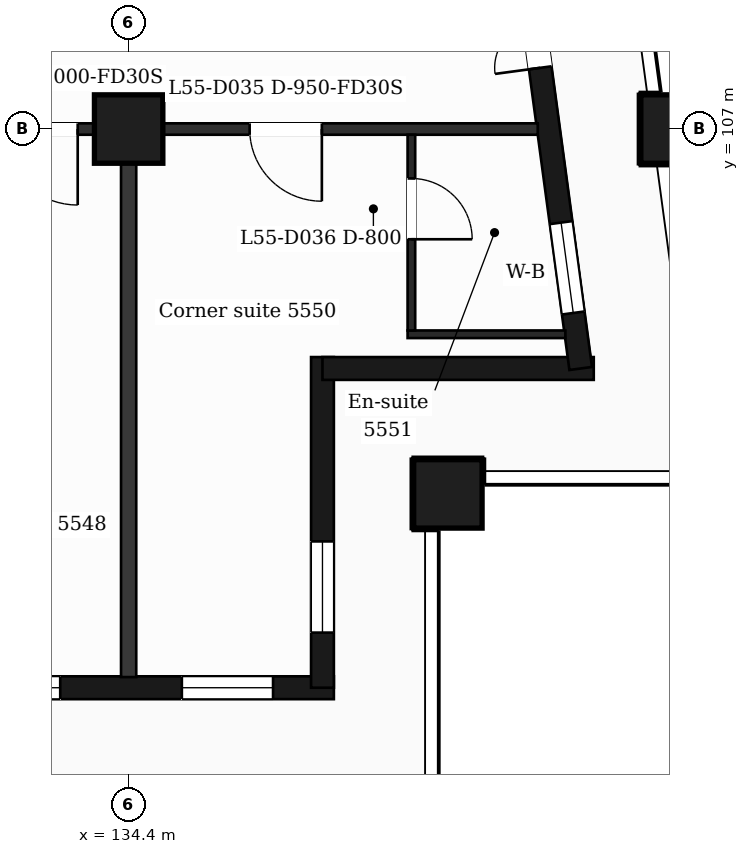
"""IFC4 building model, lengths in metres.
Left out: names, types, materials, properties, quantities, classifications, styles, units other than length and angle.
Written with IfcOpenShell. Run it as: python <this file> out.ifc"""

import sys

from ifc_helpers import new_model, si_unit, direction, frame, frame_2d, origin, origin_2d, place, context, subcontext, project, spatial, rectangle, extrude, element, fill, save


model = new_model("IFC4")
c1 = context("Model", 3, precision=1e-05, world=origin(), true_north=direction((0.0, 1.0)))
c2 = subcontext(c1, "Body", "Model", "MODEL_VIEW")
j1 = project(units=[si_unit("LENGTHUNIT", "METRE"), si_unit("PLANEANGLEUNIT", "RADIAN")], contexts=[c1])
p1 = place(None, origin())
s1 = spatial("IfcSite", under=j1, at=p1, CompositionType="ELEMENT")
p2 = place(p1, origin())
s2 = spatial("IfcBuilding", under=s1, at=p2, CompositionType="ELEMENT")
p3 = place(p2, frame((0.0, 0.0, 228.1)))
s3 = spatial("IfcBuildingStorey", under=s2, at=p3, CompositionType="ELEMENT", Elevation=228.1)
for number, where, z_axis, x_axis in (
    (1, (138.6, 102.2, 0.0), (0.0, 0.0, 1.0), (1.0, 0.0, 0.0)),
    (2, (134.4, 107.0, 0.0), (0.0, 0.0, 1.0), (1.0, 0.0, 0.0)),
    (3, (141.588, 107.0, 0.0), (0.0, 0.0, 1.0), (1.0, 0.0, 0.0)),
):
    element("IfcColumn", number, at=place(p3, frame(where, z_axis=z_axis, x_axis=x_axis)), inside=s3, PredefinedType="COLUMN", context=c2, shape_type="SweptSolid", body=[
        extrude(rectangle(XDim=0.9, YDim=0.9, at=origin_2d()), origin(), (0.0, 0.0, 1.0), 3.7),
    ])
p4 = place(p3, frame((89.85, 99.65, 0.0), z_axis=(0.0, 0.0, 1.0), x_axis=(1.0, 0.0, 0.0)))
e4 = element("IfcWall", 4, at=p4, inside=s3, PredefinedType="SOLIDWALL", context=c2, shape_type="SweptSolid", body=[
    extrude(rectangle(XDim=47.25, YDim=0.3, at=frame_2d((23.625, 0.0))), origin(), (0.0, 0.0, 1.0), 3.38),
])
p5 = place(p4, frame((0.725, 0.0, 0.9)))
e5 = element("IfcOpeningElement", 5, at=p5, cuts=e4, PredefinedType="OPENING", context=c2, shape_type="SweptSolid", body=[
    extrude(rectangle(XDim=1.2, YDim=2.1, at=frame_2d((0.6, 1.05))), frame((0.0, 0.16, 0.0), z_axis=(0.0, -1.0, 0.0), x_axis=(1.0, 0.0, 0.0)), (0.0, 0.0, 1.0), 0.32),
])
p6 = place(p4, frame((3.45, 0.0, 0.9)))
e6 = element("IfcOpeningElement", 6, at=p6, cuts=e4, PredefinedType="OPENING", context=c2, shape_type="SweptSolid", body=[
    extrude(rectangle(XDim=2.4, YDim=2.1, at=frame_2d((1.2, 1.05))), frame((0.0, 0.16, 0.0), z_axis=(0.0, -1.0, 0.0), x_axis=(1.0, 0.0, 0.0)), (0.0, 0.0, 1.0), 0.32),
])
p7 = place(p4, frame((7.35, 0.0, 0.0)))
e7 = element("IfcOpeningElement", 7, at=p7, cuts=e4, PredefinedType="OPENING", context=c2, shape_type="SweptSolid", body=[
    extrude(rectangle(XDim=1.2, YDim=2.4, at=frame_2d((0.6, 1.2))), frame((0.0, 0.16, 0.0), z_axis=(0.0, -1.0, 0.0), x_axis=(1.0, 0.0, 0.0)), (0.0, 0.0, 1.0), 0.32),
])
p8 = place(p4, frame((9.15, 0.0, 0.9)))
e8 = element("IfcOpeningElement", 8, at=p8, cuts=e4, PredefinedType="OPENING", context=c2, shape_type="SweptSolid", body=[
    extrude(rectangle(XDim=1.2, YDim=2.1, at=frame_2d((0.6, 1.05))), frame((0.0, 0.16, 0.0), z_axis=(0.0, -1.0, 0.0), x_axis=(1.0, 0.0, 0.0)), (0.0, 0.0, 1.0), 0.32),
])
p9 = place(p4, frame((11.85, 0.0, 0.9)))
e9 = element("IfcOpeningElement", 9, at=p9, cuts=e4, PredefinedType="OPENING", context=c2, shape_type="SweptSolid", body=[
    extrude(rectangle(XDim=2.4, YDim=2.1, at=frame_2d((1.2, 1.05))), frame((0.0, 0.16, 0.0), z_axis=(0.0, -1.0, 0.0), x_axis=(1.0, 0.0, 0.0)), (0.0, 0.0, 1.0), 0.32),
])
p10 = place(p4, frame((16.05, 0.0, 0.9)))
e10 = element("IfcOpeningElement", 10, at=p10, cuts=e4, PredefinedType="OPENING", context=c2, shape_type="SweptSolid", body=[
    extrude(rectangle(XDim=2.4, YDim=2.1, at=frame_2d((1.2, 1.05))), frame((0.0, 0.16, 0.0), z_axis=(0.0, -1.0, 0.0), x_axis=(1.0, 0.0, 0.0)), (0.0, 0.0, 1.0), 0.32),
])
p11 = place(p4, frame((20.85, 0.0, 0.9)))
e11 = element("IfcOpeningElement", 11, at=p11, cuts=e4, PredefinedType="OPENING", context=c2, shape_type="SweptSolid", body=[
    extrude(rectangle(XDim=1.2, YDim=2.1, at=frame_2d((0.6, 1.05))), frame((0.0, 0.16, 0.0), z_axis=(0.0, -1.0, 0.0), x_axis=(1.0, 0.0, 0.0)), (0.0, 0.0, 1.0), 0.32),
])
p12 = place(p4, frame((25.05, 0.0, 0.9)))
e12 = element("IfcOpeningElement", 12, at=p12, cuts=e4, PredefinedType="OPENING", context=c2, shape_type="SweptSolid", body=[
    extrude(rectangle(XDim=1.2, YDim=2.1, at=frame_2d((0.6, 1.05))), frame((0.0, 0.16, 0.0), z_axis=(0.0, -1.0, 0.0), x_axis=(1.0, 0.0, 0.0)), (0.0, 0.0, 1.0), 0.32),
])
p13 = place(p4, frame((28.65, 0.0, 0.9)))
e13 = element("IfcOpeningElement", 13, at=p13, cuts=e4, PredefinedType="OPENING", context=c2, shape_type="SweptSolid", body=[
    extrude(rectangle(XDim=2.4, YDim=2.1, at=frame_2d((1.2, 1.05))), frame((0.0, 0.16, 0.0), z_axis=(0.0, -1.0, 0.0), x_axis=(1.0, 0.0, 0.0)), (0.0, 0.0, 1.0), 0.32),
])
p14 = place(p4, frame((32.85, 0.0, 0.9)))
e14 = element("IfcOpeningElement", 14, at=p14, cuts=e4, PredefinedType="OPENING", context=c2, shape_type="SweptSolid", body=[
    extrude(rectangle(XDim=2.4, YDim=2.1, at=frame_2d((1.2, 1.05))), frame((0.0, 0.16, 0.0), z_axis=(0.0, -1.0, 0.0), x_axis=(1.0, 0.0, 0.0)), (0.0, 0.0, 1.0), 0.32),
])
p15 = place(p4, frame((37.05, 0.0, 0.9)))
e15 = element("IfcOpeningElement", 15, at=p15, cuts=e4, PredefinedType="OPENING", context=c2, shape_type="SweptSolid", body=[
    extrude(rectangle(XDim=2.4, YDim=2.1, at=frame_2d((1.2, 1.05))), frame((0.0, 0.16, 0.0), z_axis=(0.0, -1.0, 0.0), x_axis=(1.0, 0.0, 0.0)), (0.0, 0.0, 1.0), 0.32),
])
p16 = place(p4, frame((41.25, 0.0, 0.9)))
e16 = element("IfcOpeningElement", 16, at=p16, cuts=e4, PredefinedType="OPENING", context=c2, shape_type="SweptSolid", body=[
    extrude(rectangle(XDim=2.4, YDim=2.1, at=frame_2d((1.2, 1.05))), frame((0.0, 0.16, 0.0), z_axis=(0.0, -1.0, 0.0), x_axis=(1.0, 0.0, 0.0)), (0.0, 0.0, 1.0), 0.32),
])
p17 = place(p4, frame((45.25, 0.0, 0.9)))
e17 = element("IfcOpeningElement", 17, at=p17, cuts=e4, PredefinedType="OPENING", context=c2, shape_type="SweptSolid", body=[
    extrude(rectangle(XDim=1.2, YDim=2.1, at=frame_2d((0.6, 1.05))), frame((0.0, 0.16, 0.0), z_axis=(0.0, -1.0, 0.0), x_axis=(1.0, 0.0, 0.0)), (0.0, 0.0, 1.0), 0.32),
])
p18 = place(p3, frame((136.95, 99.65, 0.0), z_axis=(0.0, 0.0, 1.0), x_axis=(0.0, 1.0, 0.0)))
e18 = element("IfcWall", 18, at=p18, inside=s3, PredefinedType="SOLIDWALL", context=c2, shape_type="SweptSolid", body=[
    extrude(rectangle(XDim=4.35, YDim=0.3, at=frame_2d((2.175, 0.0))), origin(), (0.0, 0.0, 1.0), 3.38),
])
p19 = place(p18, frame((0.725, 0.0, 0.9)))
e19 = element("IfcOpeningElement", 19, at=p19, cuts=e18, PredefinedType="OPENING", context=c2, shape_type="SweptSolid", body=[
    extrude(rectangle(XDim=1.2, YDim=2.1, at=frame_2d((0.6, 1.05))), frame((0.0, 0.16, 0.0), z_axis=(0.0, -1.0, 0.0), x_axis=(1.0, 0.0, 0.0)), (0.0, 0.0, 1.0), 0.32),
])
p20 = place(p3, frame((136.95, 103.85, 0.0), z_axis=(0.0, 0.0, 1.0), x_axis=(1.0, 0.0, 0.0)))
e20 = element("IfcWall", 20, at=p20, inside=s3, PredefinedType="SOLIDWALL", context=c2, shape_type="SweptSolid", body=[
    extrude(rectangle(XDim=3.569, YDim=0.3, at=frame_2d((1.785, 0.0))), origin(), (0.0, 0.0, 1.0), 3.38),
])
p21 = place(p3, frame((140.348, 103.85, 0.0), z_axis=(0.0, 0.0, 1.0), x_axis=(-0.133431549479, 0.991058031401, 0.0)))
e21 = element("IfcWall", 21, at=p21, inside=s3, PredefinedType="SOLIDWALL", context=c2, shape_type="SweptSolid", body=[
    extrude(rectangle(XDim=6.609, YDim=0.3, at=frame_2d((3.304, 0.0))), origin(), (0.0, 0.0, 1.0), 3.38),
])
p22 = place(p21, frame((0.737, 0.0, 0.9)))
e22 = element("IfcOpeningElement", 22, at=p22, cuts=e21, PredefinedType="OPENING", context=c2, shape_type="SweptSolid", body=[
    extrude(rectangle(XDim=1.2, YDim=2.1, at=frame_2d((0.6, 1.05))), frame((0.0, 0.16, 0.0), z_axis=(0.0, -1.0, 0.0), x_axis=(1.0, 0.0, 0.0)), (0.0, 0.0, 1.0), 0.32),
])
p23 = place(p21, frame((3.991, 0.0, 0.0)))
e23 = element("IfcOpeningElement", 23, at=p23, cuts=e21, PredefinedType="OPENING", context=c2, shape_type="SweptSolid", body=[
    extrude(rectangle(XDim=1.2, YDim=2.4, at=frame_2d((0.6, 1.2))), frame((0.0, 0.16, 0.0), z_axis=(0.0, -1.0, 0.0), x_axis=(1.0, 0.0, 0.0)), (0.0, 0.0, 1.0), 0.32),
])
p24 = place(p3, frame((138.07, 104.3, 0.0), z_axis=(0.0, 0.0, 1.0), x_axis=(1.0, 0.0, 0.0)))
e24 = element("IfcWall", 24, at=p24, inside=s3, PredefinedType="PARTITIONING", context=c2, shape_type="SweptSolid", body=[
    extrude(rectangle(XDim=2.076, YDim=0.1, at=frame_2d((1.038, 0.0))), origin(), (0.0, 0.0, 1.0), 3.38),
])
p25 = place(p3, frame((87.018, 107.0, 0.0), z_axis=(0.0, 0.0, 1.0), x_axis=(1.0, 0.0, 0.0)))
e25 = element("IfcWall", 25, at=p25, inside=s3, PredefinedType="PARTITIONING", context=c2, shape_type="SweptSolid", body=[
    extrude(rectangle(XDim=52.765, YDim=0.15, at=frame_2d((26.382, 0.0))), origin(), (0.0, 0.0, 1.0), 3.38),
])
p26 = place(p25, frame((0.707, 0.0, 0.0)))
e26 = element("IfcOpeningElement", 26, at=p26, cuts=e25, PredefinedType="OPENING", context=c2, shape_type="SweptSolid", body=[
    extrude(rectangle(XDim=0.95, YDim=2.1, at=frame_2d((0.475, 1.05))), frame((0.0, 0.085, 0.0), z_axis=(0.0, -1.0, 0.0), x_axis=(1.0, 0.0, 0.0)), (0.0, 0.0, 1.0), 0.17),
])
p27 = place(p25, frame((6.894, 0.0, 0.0)))
e27 = element("IfcOpeningElement", 27, at=p27, cuts=e25, PredefinedType="OPENING", context=c2, shape_type="SweptSolid", body=[
    extrude(rectangle(XDim=0.95, YDim=2.1, at=frame_2d((0.475, 1.05))), frame((0.0, 0.085, 0.0), z_axis=(0.0, -1.0, 0.0), x_axis=(1.0, 0.0, 0.0)), (0.0, 0.0, 1.0), 0.17),
])
p28 = place(p25, frame((15.662, 0.0, 0.0)))
e28 = element("IfcOpeningElement", 28, at=p28, cuts=e25, PredefinedType="OPENING", context=c2, shape_type="SweptSolid", body=[
    extrude(rectangle(XDim=0.95, YDim=2.1, at=frame_2d((0.475, 1.05))), frame((0.0, 0.085, 0.0), z_axis=(0.0, -1.0, 0.0), x_axis=(1.0, 0.0, 0.0)), (0.0, 0.0, 1.0), 0.17),
])
p29 = place(p25, frame((18.257, 0.0, 0.0)))
e29 = element("IfcOpeningElement", 29, at=p29, cuts=e25, PredefinedType="OPENING", context=c2, shape_type="SweptSolid", body=[
    extrude(rectangle(XDim=0.95, YDim=2.1, at=frame_2d((0.475, 1.05))), frame((0.0, 0.085, 0.0), z_axis=(0.0, -1.0, 0.0), x_axis=(1.0, 0.0, 0.0)), (0.0, 0.0, 1.0), 0.17),
])
p30 = place(p25, frame((28.607, 0.0, 0.0)))
e30 = element("IfcOpeningElement", 30, at=p30, cuts=e25, PredefinedType="OPENING", context=c2, shape_type="SweptSolid", body=[
    extrude(rectangle(XDim=1.0, YDim=2.1, at=frame_2d((0.5, 1.05))), frame((0.0, 0.085, 0.0), z_axis=(0.0, -1.0, 0.0), x_axis=(1.0, 0.0, 0.0)), (0.0, 0.0, 1.0), 0.17),
])
p31 = place(p25, frame((31.302, 0.0, 0.0)))
e31 = element("IfcOpeningElement", 31, at=p31, cuts=e25, PredefinedType="OPENING", context=c2, shape_type="SweptSolid", body=[
    extrude(rectangle(XDim=0.95, YDim=2.1, at=frame_2d((0.475, 1.05))), frame((0.0, 0.085, 0.0), z_axis=(0.0, -1.0, 0.0), x_axis=(1.0, 0.0, 0.0)), (0.0, 0.0, 1.0), 0.17),
])
p32 = place(p25, frame((35.057, 0.0, 0.0)))
e32 = element("IfcOpeningElement", 32, at=p32, cuts=e25, PredefinedType="OPENING", context=c2, shape_type="SweptSolid", body=[
    extrude(rectangle(XDim=0.95, YDim=2.1, at=frame_2d((0.475, 1.05))), frame((0.0, 0.085, 0.0), z_axis=(0.0, -1.0, 0.0), x_axis=(1.0, 0.0, 0.0)), (0.0, 0.0, 1.0), 0.17),
])
p33 = place(p25, frame((41.957, 0.0, 0.0)))
e33 = element("IfcOpeningElement", 33, at=p33, cuts=e25, PredefinedType="OPENING", context=c2, shape_type="SweptSolid", body=[
    extrude(rectangle(XDim=0.95, YDim=2.1, at=frame_2d((0.475, 1.05))), frame((0.0, 0.085, 0.0), z_axis=(0.0, -1.0, 0.0), x_axis=(1.0, 0.0, 0.0)), (0.0, 0.0, 1.0), 0.17),
])
p34 = place(p25, frame((45.712, 0.0, 0.0)))
e34 = element("IfcOpeningElement", 34, at=p34, cuts=e25, PredefinedType="OPENING", context=c2, shape_type="SweptSolid", body=[
    extrude(rectangle(XDim=1.0, YDim=2.1, at=frame_2d((0.5, 1.05))), frame((0.0, 0.085, 0.0), z_axis=(0.0, -1.0, 0.0), x_axis=(1.0, 0.0, 0.0)), (0.0, 0.0, 1.0), 0.17),
])
p35 = place(p25, frame((48.974, 0.0, 0.0)))
e35 = element("IfcOpeningElement", 35, at=p35, cuts=e25, PredefinedType="OPENING", context=c2, shape_type="SweptSolid", body=[
    extrude(rectangle(XDim=0.95, YDim=2.1, at=frame_2d((0.475, 1.05))), frame((0.0, 0.085, 0.0), z_axis=(0.0, -1.0, 0.0), x_axis=(1.0, 0.0, 0.0)), (0.0, 0.0, 1.0), 0.17),
])
p36 = place(p3, frame((134.4, 99.79, 0.0), z_axis=(0.0, 0.0, 1.0), x_axis=(0.0, 1.0, 0.0)))
e36 = element("IfcWall", 36, at=p36, inside=s3, PredefinedType="PARTITIONING", context=c2, shape_type="SweptSolid", body=[
    extrude(rectangle(XDim=7.135, YDim=0.2, at=frame_2d((3.567, 0.0))), origin(), (0.0, 0.0, 1.0), 3.38),
])
p37 = place(p3, frame((138.12, 104.35, 0.0), z_axis=(0.0, 0.0, 1.0), x_axis=(0.0, 1.0, 0.0)))
e37 = element("IfcWall", 37, at=p37, inside=s3, PredefinedType="PARTITIONING", context=c2, shape_type="SweptSolid", body=[
    extrude(rectangle(XDim=2.575, YDim=0.1, at=frame_2d((1.288, 0.0))), origin(), (0.0, 0.0, 1.0), 3.38),
])
p38 = place(p37, frame((1.2, 0.0, 0.0)))
e38 = element("IfcOpeningElement", 38, at=p38, cuts=e37, PredefinedType="OPENING", context=c2, shape_type="SweptSolid", body=[
    extrude(rectangle(XDim=0.8, YDim=2.1, at=frame_2d((0.4, 1.05))), frame((0.0, 0.06, 0.0), z_axis=(0.0, -1.0, 0.0), x_axis=(1.0, 0.0, 0.0)), (0.0, 0.0, 1.0), 0.12),
])
p39 = place(p16, origin())
e39 = element("IfcWindow", 39, at=p39, inside=s3, PartitioningType="SINGLE_PANEL", PredefinedType="WINDOW", context=c2, shape_type="SweptSolid", body=[
    extrude(rectangle(XDim=2.4, YDim=2.1, at=frame_2d((1.2, 1.05))), frame((0.0, 0.03, 0.0), z_axis=(0.0, -1.0, 0.0), x_axis=(1.0, 0.0, 0.0)), (0.0, 0.0, 1.0), 0.06),
])
fill(e16, e39)
p40 = place(p17, origin())
e40 = element("IfcWindow", 40, at=p40, inside=s3, PartitioningType="SINGLE_PANEL", PredefinedType="WINDOW", context=c2, shape_type="SweptSolid", body=[
    extrude(rectangle(XDim=1.2, YDim=2.1, at=frame_2d((0.6, 1.05))), frame((0.0, 0.03, 0.0), z_axis=(0.0, -1.0, 0.0), x_axis=(1.0, 0.0, 0.0)), (0.0, 0.0, 1.0), 0.06),
])
fill(e17, e40)
p41 = place(p19, origin())
e41 = element("IfcWindow", 41, at=p41, inside=s3, PartitioningType="SINGLE_PANEL", PredefinedType="WINDOW", context=c2, shape_type="SweptSolid", body=[
    extrude(rectangle(XDim=1.2, YDim=2.1, at=frame_2d((0.6, 1.05))), frame((0.0, 0.03, 0.0), z_axis=(0.0, -1.0, 0.0), x_axis=(1.0, 0.0, 0.0)), (0.0, 0.0, 1.0), 0.06),
])
fill(e19, e41)
p42 = place(p22, origin())
e42 = element("IfcWindow", 42, at=p42, inside=s3, PartitioningType="SINGLE_PANEL", PredefinedType="WINDOW", context=c2, shape_type="SweptSolid", body=[
    extrude(rectangle(XDim=1.2, YDim=2.1, at=frame_2d((0.6, 1.05))), frame((0.0, 0.03, 0.0), z_axis=(0.0, -1.0, 0.0), x_axis=(1.0, 0.0, 0.0)), (0.0, 0.0, 1.0), 0.06),
])
fill(e22, e42)
p43 = place(p23, origin())
e43 = element("IfcDoor", 43, at=p43, inside=s3, OperationType="DOUBLE_DOOR_SINGLE_SWING", PredefinedType="DOOR", context=c2, shape_type="SweptSolid", body=[
    extrude(rectangle(XDim=1.2, YDim=2.4, at=frame_2d((0.6, 1.2))), frame((0.0, 0.025, 0.0), z_axis=(0.0, -1.0, 0.0), x_axis=(1.0, 0.0, 0.0)), (0.0, 0.0, 1.0), 0.05),
])
fill(e23, e43)
p44 = place(p34, origin())
e44 = element("IfcDoor", 44, at=p44, inside=s3, OperationType="SINGLE_SWING_RIGHT", PredefinedType="DOOR", context=c2, shape_type="SweptSolid", body=[
    extrude(rectangle(XDim=1.0, YDim=2.1, at=frame_2d((0.5, 1.05))), frame((0.0, 0.025, 0.0), z_axis=(0.0, -1.0, 0.0), x_axis=(1.0, 0.0, 0.0)), (0.0, 0.0, 1.0), 0.05),
])
fill(e34, e44)
p45 = place(p35, origin())
e45 = element("IfcDoor", 45, at=p45, inside=s3, OperationType="SINGLE_SWING_RIGHT", PredefinedType="DOOR", context=c2, shape_type="SweptSolid", body=[
    extrude(rectangle(XDim=0.95, YDim=2.1, at=frame_2d((0.475, 1.05))), frame((0.0, 0.025, 0.0), z_axis=(0.0, -1.0, 0.0), x_axis=(1.0, 0.0, 0.0)), (0.0, 0.0, 1.0), 0.05),
])
fill(e35, e45)
p46 = place(p38, origin())
e46 = element("IfcDoor", 46, at=p46, inside=s3, OperationType="SINGLE_SWING_LEFT", PredefinedType="DOOR", context=c2, shape_type="SweptSolid", body=[
    extrude(rectangle(XDim=0.8, YDim=2.1, at=frame_2d((0.4, 1.05))), frame((0.0, 0.025, 0.0), z_axis=(0.0, -1.0, 0.0), x_axis=(1.0, 0.0, 0.0)), (0.0, 0.0, 1.0), 0.05),
])
fill(e38, e46)
save(model, sys.argv[1])
